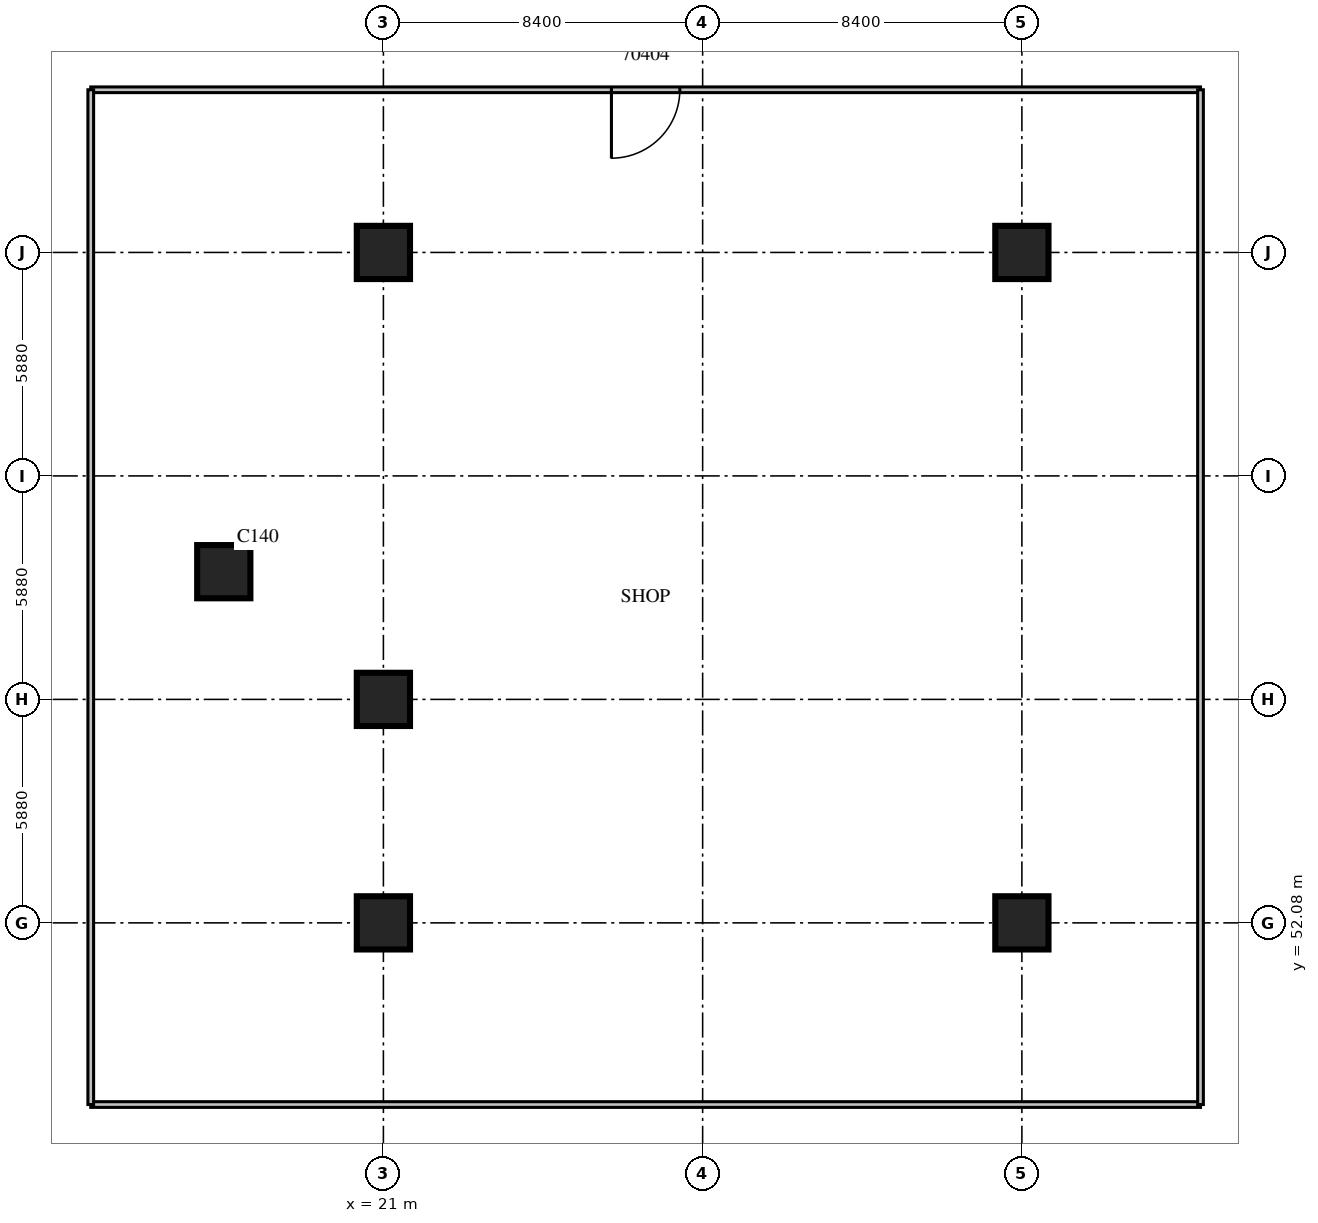
"""IFC4 building model, lengths in metres.
Left out: names, types, materials, properties, quantities, classifications, styles, units other than length and angle.
Written with IfcOpenShell. Run it as: python <this file> out.ifc"""

import sys

from ifc_helpers import new_model, si_unit, direction, frame, frame_2d, origin, origin_2d, place, context, subcontext, project, spatial, rectangle, extrude, source, transform, mapped, element, fill, save


model = new_model("IFC4")
c1 = context("Model", 3, precision=1e-05, world=origin(), true_north=direction((0.0, 1.0)))
c2 = subcontext(c1, "Body", "Model", "MODEL_VIEW")
j1 = project(units=[si_unit("LENGTHUNIT", "METRE"), si_unit("PLANEANGLEUNIT", "RADIAN")], contexts=[c1])
p1 = place(None, origin())
s1 = spatial("IfcSite", under=j1, at=p1, CompositionType="ELEMENT")
p2 = place(p1, origin())
s2 = spatial("IfcBuilding", under=s1, at=p2, CompositionType="ELEMENT")
p3 = place(p2, frame((0.0, 0.0, 7.5)))
s3 = spatial("IfcBuildingStorey", under=s2, at=p3, CompositionType="ELEMENT", Elevation=7.5)
m1 = source(origin(), c2, "Body", "SweptSolid", [
    extrude(rectangle(XDim=1.4, YDim=1.4, at=origin_2d()), origin(), (0.0, 0.0, 1.0), 5.4),
])
for number, where, z_axis, x_axis in (
    (1, (16.8, 61.32, 0.0), (0.0, 0.0, 1.0), (1.0, 0.0, 0.0)),
    (2, (21.0, 52.08, 0.0), (0.0, 0.0, 1.0), (1.0, 0.0, 0.0)),
    (3, (21.0, 57.96, 0.0), (0.0, 0.0, 1.0), (1.0, 0.0, 0.0)),
    (4, (21.0, 69.72, 0.0), (0.0, 0.0, 1.0), (1.0, 0.0, 0.0)),
    (5, (37.8, 52.08, 0.0), (0.0, 0.0, 1.0), (1.0, 0.0, 0.0)),
    (6, (37.8, 69.72, 0.0), (0.0, 0.0, 1.0), (1.0, 0.0, 0.0)),
):
    element("IfcColumn", number, at=place(p3, frame(where, z_axis=z_axis, x_axis=x_axis)), inside=s3, PredefinedType="COLUMN", context=c2, shape_type="MappedRepresentation", body=[
        mapped(m1, transform((0.0, 0.0, 0.0), scale=1.0)),
    ])
m2 = source(origin(), c2, "Body", "SweptSolid", [
    extrude(rectangle(XDim=29.2, YDim=0.15, at=frame_2d((14.6, 0.0))), origin(), (0.0, 0.0, 1.0), 4.8),
])
p4 = place(p3, frame((13.3, 47.3, 0.0), z_axis=(0.0, 0.0, 1.0), x_axis=(1.0, 0.0, 0.0)))
e7 = element("IfcWall", 7, at=p4, inside=s3, PredefinedType="PARTITIONING", context=c2, shape_type="MappedRepresentation", body=[
    mapped(m2, transform((0.0, 0.0, 0.0), scale=1.0)),
])
p5 = place(p3, frame((13.3, 74.0, 0.0), z_axis=(0.0, 0.0, 1.0), x_axis=(1.0, 0.0, 0.0)))
e8 = element("IfcWall", 8, at=p5, inside=s3, PredefinedType="PARTITIONING", context=c2, shape_type="MappedRepresentation", body=[
    mapped(m2, transform((0.0, 0.0, 0.0), scale=1.0)),
])
m3 = source(origin(), c2, "Body", "SweptSolid", [
    extrude(rectangle(XDim=1.8, YDim=2.1, at=frame_2d((0.9, 1.05))), frame((0.0, 0.085, 0.0), z_axis=(0.0, -1.0, 0.0), x_axis=(1.0, 0.0, 0.0)), (0.0, 0.0, 1.0), 0.17),
])
p6 = place(p5, frame((13.7, 0.0, 0.0)))
e9 = element("IfcOpeningElement", 9, at=p6, cuts=e8, PredefinedType="OPENING", context=c2, shape_type="MappedRepresentation", body=[
    mapped(m3, transform((0.0, 0.0, 0.0), scale=1.0)),
])
m4 = source(origin(), c2, "Body", "SweptSolid", [
    extrude(rectangle(XDim=26.7, YDim=0.15, at=frame_2d((13.35, 0.0))), origin(), (0.0, 0.0, 1.0), 4.8),
])
for number, where, z_axis, x_axis in (
    (10, (13.3, 47.3, 0.0), (0.0, 0.0, 1.0), (0.0, 1.0, 0.0)),
    (11, (42.5, 47.3, 0.0), (0.0, 0.0, 1.0), (0.0, 1.0, 0.0)),
):
    element("IfcWall", number, at=place(p3, frame(where, z_axis=z_axis, x_axis=x_axis)), inside=s3, PredefinedType="PARTITIONING", context=c2, shape_type="MappedRepresentation", body=[
        mapped(m4, transform((0.0, 0.0, 0.0), scale=1.0)),
    ])
m5 = source(origin(), c2, "Body", "SweptSolid", [
    extrude(rectangle(XDim=1.8, YDim=2.1, at=frame_2d((0.9, 1.05))), frame((0.0, 0.025, 0.0), z_axis=(0.0, -1.0, 0.0), x_axis=(1.0, 0.0, 0.0)), (0.0, 0.0, 1.0), 0.05),
])
p7 = place(p6, origin())
e12 = element("IfcDoor", 12, at=p7, inside=s3, OperationType="DOUBLE_DOOR_SINGLE_SWING", PredefinedType="DOOR", context=c2, shape_type="MappedRepresentation", body=[
    mapped(m5, transform((0.0, 0.0, 0.0), scale=1.0)),
])
fill(e9, e12)
save(model, sys.argv[1])
